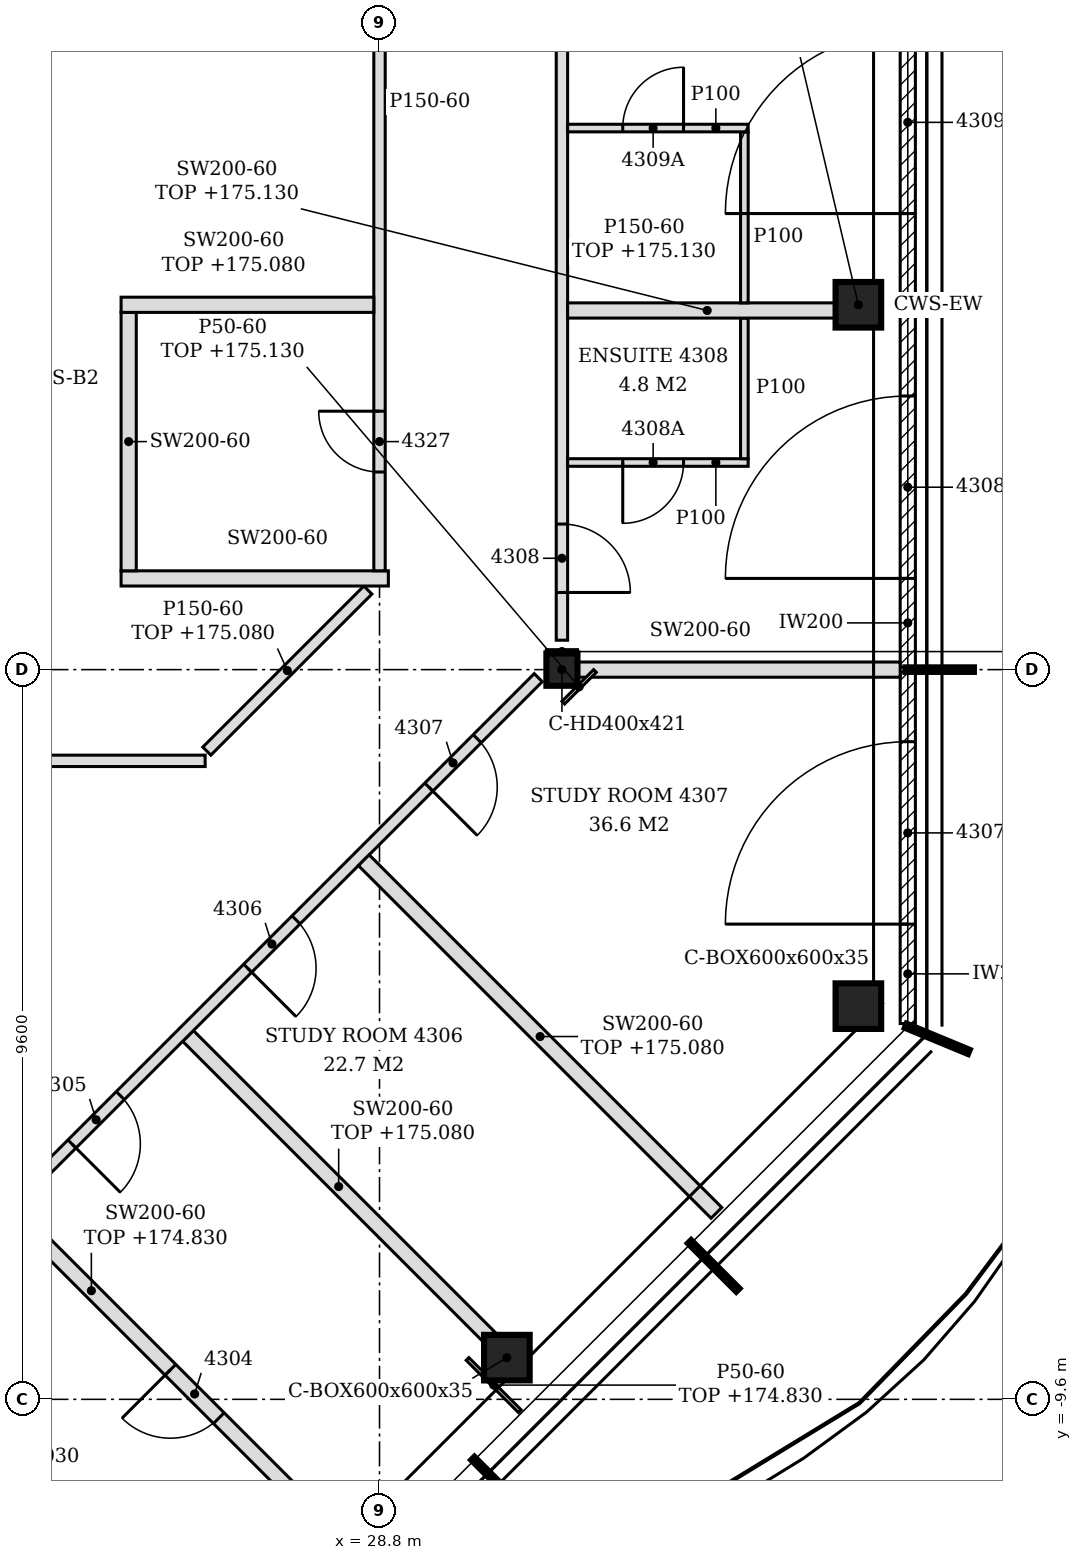
"""IFC4 building model, lengths in metres.
Left out: names, types, materials, properties, quantities, classifications, styles, units other than length and angle.
Written with IfcOpenShell. Run it as: python <this file> out.ifc"""

import sys

from ifc_helpers import new_model, si_unit, direction, frame, frame_2d, origin, origin_2d, place, context, subcontext, project, spatial, polyline, rectangle, hollow_rectangle, i_section, outline, extrude, clip, halfspace, element, fill, save


model = new_model("IFC4")
c1 = context("Model", 3, precision=1e-05, world=origin(), true_north=direction((0.0, 1.0)))
c2 = subcontext(c1, "Body", "Model", "MODEL_VIEW")
j1 = project(units=[si_unit("LENGTHUNIT", "METRE"), si_unit("PLANEANGLEUNIT", "RADIAN")], contexts=[c1])
p1 = place(None, origin())
s1 = spatial("IfcSite", under=j1, at=p1, CompositionType="ELEMENT")
p2 = place(p1, origin())
s2 = spatial("IfcBuilding", under=s1, at=p2, CompositionType="ELEMENT")
p3 = place(p2, frame((0.0, 0.0, 172.2)))
s3 = spatial("IfcBuildingStorey", under=s2, at=p3, CompositionType="ELEMENT", Elevation=172.2)
p4 = place(p3, frame((30.476, -9.052, -0.15), z_axis=(0.06235395728, -0.04152421884, 0.997189913337), x_axis=(0.554283476609, 0.832327956732, 0.0)))
e1 = element("IfcColumn", 1, at=p4, inside=s3, PredefinedType="COLUMN", context=c2, shape_type="Clipping", body=[
    clip(clip(extrude(hollow_rectangle(XDim=0.6, YDim=0.6, WallThickness=0.035, at=origin_2d()), origin(), (0.0, 0.0, 1.0), 3.61), halfspace(frame((0.0, 0.0, 0.011), z_axis=(0.0, 0.0, 1.0), x_axis=(1.0, 0.0, 0.0)), True)), halfspace(frame((0.0, 0.0, 3.588), z_axis=(0.0, 0.0, 1.0), x_axis=(1.0, 0.0, 0.0)), False)),
])
p5 = place(p3, frame((35.1, -4.427, -0.15), z_axis=(0.062286590776, -0.041524393851, 0.99719411617), x_axis=(0.554700196225, 0.832050294338, 0.0)))
e2 = element("IfcColumn", 2, at=p5, inside=s3, PredefinedType="COLUMN", context=c2, shape_type="Clipping", body=[
    clip(clip(extrude(hollow_rectangle(XDim=0.6, YDim=0.6, WallThickness=0.035, at=origin_2d()), origin(), (0.0, 0.0, 1.0), 3.61), halfspace(frame((0.0, 0.0, 0.011), z_axis=(0.0, 0.0, 1.0), x_axis=(1.0, 0.0, 0.0)), True)), halfspace(frame((0.0, 0.0, 3.588), z_axis=(0.0, 0.0, 1.0), x_axis=(1.0, 0.0, 0.0)), False)),
])
p6 = place(p3, frame((35.1, 4.8, -0.15), z_axis=(0.062286415717, -0.041591906261, 0.997191313515), x_axis=(0.555325171193, 0.831633305153, 0.0)))
e3 = element("IfcColumn", 3, at=p6, inside=s3, PredefinedType="COLUMN", context=c2, shape_type="Clipping", body=[
    clip(clip(extrude(hollow_rectangle(XDim=0.6, YDim=0.6, WallThickness=0.035, at=origin_2d()), origin(), (0.0, 0.0, 1.0), 3.61), halfspace(frame((0.0, 0.0, 0.011), z_axis=(0.0, 0.0, 1.0), x_axis=(1.0, 0.0, 0.0)), True)), halfspace(frame((0.0, 0.0, 3.588), z_axis=(0.0, 0.0, 1.0), x_axis=(1.0, 0.0, 0.0)), False)),
])
p7 = place(p3, frame((31.2, 0.0, -0.15), z_axis=(0.0, 0.0, 1.0), x_axis=(1.0, 0.0, 0.0)))
e4 = element("IfcColumn", 4, at=p7, inside=s3, PredefinedType="COLUMN", context=c2, shape_type="SweptSolid", body=[
    extrude(i_section(OverallWidth=0.409, OverallDepth=0.425, WebThickness=0.033, FlangeThickness=0.052, FilletRadius=0.015, at=origin_2d()), origin(), (0.0, 0.0, 1.0), 3.6),
])
p8 = place(p3, frame((35.75, -4.656, 0.0), z_axis=(0.0, 0.0, 1.0), x_axis=(0.0, 1.0, 0.0)))
e5 = element("IfcWall", 5, at=p8, inside=s3, PredefinedType="NOTDEFINED", context=c2, shape_type="SweptSolid", body=[
    extrude(rectangle(XDim=4.626, YDim=0.2, at=frame_2d((2.313, 0.0))), origin(), (0.0, 0.0, 1.0), 3.45),
])
p9 = place(p8, frame((1.308, 0.0, 0.0)))
e6 = element("IfcOpeningElement", 6, at=p9, cuts=e5, PredefinedType="OPENING", context=c2, shape_type="SweptSolid", body=[
    extrude(rectangle(XDim=2.4, YDim=2.4, at=frame_2d((1.2, 1.2))), frame((0.0, 0.11, 0.0), z_axis=(0.0, -1.0, 0.0), x_axis=(1.0, 0.0, 0.0)), (0.0, 0.0, 1.0), 0.22),
])
p10 = place(p3, frame((35.75, 0.03, 0.0), z_axis=(0.0, 0.0, 1.0), x_axis=(0.0, 1.0, 0.0)))
e7 = element("IfcWall", 7, at=p10, inside=s3, PredefinedType="NOTDEFINED", context=c2, shape_type="SweptSolid", body=[
    extrude(rectangle(XDim=4.74, YDim=0.2, at=frame_2d((2.37, 0.0))), origin(), (0.0, 0.0, 1.0), 3.45),
])
p11 = place(p10, frame((1.17, 0.0, 0.0)))
e8 = element("IfcOpeningElement", 8, at=p11, cuts=e7, PredefinedType="OPENING", context=c2, shape_type="SweptSolid", body=[
    extrude(rectangle(XDim=2.4, YDim=2.4, at=frame_2d((1.2, 1.2))), frame((0.0, 0.11, 0.0), z_axis=(0.0, -1.0, 0.0), x_axis=(1.0, 0.0, 0.0)), (0.0, 0.0, 1.0), 0.22),
])
p12 = place(p3, frame((35.75, 4.83, 0.0), z_axis=(0.0, 0.0, 1.0), x_axis=(0.0, 1.0, 0.0)))
e9 = element("IfcWall", 9, at=p12, inside=s3, PredefinedType="NOTDEFINED", context=c2, shape_type="SweptSolid", body=[
    extrude(rectangle(XDim=4.74, YDim=0.2, at=frame_2d((2.37, 0.0))), origin(), (0.0, 0.0, 1.0), 3.45),
])
p13 = place(p12, frame((1.17, 0.0, 0.0)))
e10 = element("IfcOpeningElement", 10, at=p13, cuts=e9, PredefinedType="OPENING", context=c2, shape_type="SweptSolid", body=[
    extrude(rectangle(XDim=2.4, YDim=2.4, at=frame_2d((1.2, 1.2))), frame((0.0, 0.11, 0.0), z_axis=(0.0, -1.0, 0.0), x_axis=(1.0, 0.0, 0.0)), (0.0, 0.0, 1.0), 0.22),
])
p14 = place(p3, frame((25.62, -13.406, 0.0), z_axis=(0.0, 0.0, 1.0), x_axis=(-0.707185011059, 0.707028542659, 0.0)))
e11 = element("IfcWall", 11, at=p14, inside=s3, PredefinedType="PARTITIONING", context=c2, shape_type="SweptSolid", body=[
    extrude(rectangle(XDim=4.681, YDim=0.2, at=frame_2d((2.34, 0.0))), origin(), (0.0, 0.0, 1.0), 3.45),
])
p15 = place(p3, frame((28.6, -11.762, 0.0), z_axis=(0.0, 0.0, 1.0), x_axis=(-0.707125420898, 0.707088140984, 0.0)))
e12 = element("IfcWall", 12, at=p15, inside=s3, PredefinedType="PARTITIONING", context=c2, shape_type="SweptSolid", body=[
    extrude(rectangle(XDim=6.549, YDim=0.2, at=frame_2d((3.274, 0.0))), origin(), (0.0, 0.0, 1.0), 2.63),
])
p16 = place(p15, frame((2.707, 0.0, 0.0)))
e13 = element("IfcOpeningElement", 13, at=p16, cuts=e12, PredefinedType="OPENING", context=c2, shape_type="SweptSolid", body=[
    extrude(rectangle(XDim=0.9, YDim=2.1, at=frame_2d((0.45, 1.05))), frame((0.0, 0.11, 0.0), z_axis=(0.0, -1.0, 0.0), x_axis=(1.0, 0.0, 0.0)), (0.0, 0.0, 1.0), 0.22),
])
p17 = place(p3, frame((30.244, -8.782, 0.0), z_axis=(0.0, 0.0, 1.0), x_axis=(-0.707106781187, 0.707106781187, 0.0)))
e14 = element("IfcWall", 14, at=p17, inside=s3, PredefinedType="PARTITIONING", context=c2, shape_type="SweptSolid", body=[
    extrude(rectangle(XDim=5.605, YDim=0.2, at=frame_2d((2.802, 0.0))), origin(), (0.0, 0.0, 1.0), 2.88),
])
p18 = place(p3, frame((22.722, -8.272, 0.0), z_axis=(0.0, 0.0, 1.0), x_axis=(0.707106781187, 0.707106781187, 0.0)))
e15 = element("IfcWall", 15, at=p18, inside=s3, PredefinedType="PARTITIONING", context=c2, shape_type="SweptSolid", body=[
    extrude(rectangle(XDim=11.549, YDim=0.15, at=frame_2d((5.774, 0.0))), origin(), (0.0, 0.0, 1.0), 2.88),
])
p19 = place(p18, frame((2.873, 0.0, 0.0)))
e16 = element("IfcOpeningElement", 16, at=p19, cuts=e15, PredefinedType="OPENING", context=c2, shape_type="SweptSolid", body=[
    extrude(rectangle(XDim=0.9, YDim=2.1, at=frame_2d((0.45, 1.05))), frame((0.0, 0.085, 0.0), z_axis=(0.0, -1.0, 0.0), x_axis=(1.0, 0.0, 0.0)), (0.0, 0.0, 1.0), 0.17),
])
p20 = place(p18, frame((6.143, 0.0, 0.0)))
e17 = element("IfcOpeningElement", 17, at=p20, cuts=e15, PredefinedType="OPENING", context=c2, shape_type="SweptSolid", body=[
    extrude(rectangle(XDim=0.9, YDim=2.1, at=frame_2d((0.45, 1.05))), frame((0.0, 0.085, 0.0), z_axis=(0.0, -1.0, 0.0), x_axis=(1.0, 0.0, 0.0)), (0.0, 0.0, 1.0), 0.17),
])
p21 = place(p18, frame((9.513, 0.0, 0.0)))
e18 = element("IfcOpeningElement", 18, at=p21, cuts=e15, PredefinedType="OPENING", context=c2, shape_type="SweptSolid", body=[
    extrude(rectangle(XDim=0.9, YDim=2.1, at=frame_2d((0.45, 1.05))), frame((0.0, 0.085, 0.0), z_axis=(0.0, -1.0, 0.0), x_axis=(1.0, 0.0, 0.0)), (0.0, 0.0, 1.0), 0.17),
])
p22 = place(p3, frame((33.233, -7.147, 0.0), z_axis=(0.0, 0.0, 1.0), x_axis=(-0.707106781187, 0.707106781187, 0.0)))
e19 = element("IfcWall", 19, at=p22, inside=s3, PredefinedType="PARTITIONING", context=c2, shape_type="SweptSolid", body=[
    extrude(rectangle(XDim=6.562, YDim=0.2, at=frame_2d((3.281, 0.0))), origin(), (0.0, 0.0, 1.0), 2.88),
])
p23 = place(p3, frame((19.125, -1.2, 0.0), z_axis=(0.0, 0.0, 1.0), x_axis=(1.0, 0.0, 0.0)))
e20 = element("IfcWall", 20, at=p23, inside=s3, PredefinedType="PARTITIONING", context=c2, shape_type="SweptSolid", body=[
    extrude(outline(polyline([(0.0, 0.0), (7.381, 0.0), (7.381, 3.45), (0.225, 3.45), (0.223, 2.83), (0.0, 2.83), (0.0, 0.0)])), frame((0.0, 0.075, 0.0), z_axis=(0.0, -1.0, 0.0), x_axis=(1.0, 0.0, 0.0)), (0.0, 0.0, 1.0), 0.15),
])
p24 = place(p3, frame((26.528, -1.072, 0.0), z_axis=(0.0, 0.0, 1.0), x_axis=(0.707106781187, 0.707106781187, 0.0)))
e21 = element("IfcWall", 21, at=p24, inside=s3, PredefinedType="PARTITIONING", context=c2, shape_type="SweptSolid", body=[
    extrude(rectangle(XDim=2.997, YDim=0.15, at=frame_2d((1.498, 0.0))), origin(), (0.0, 0.0, 1.0), 2.88),
])
p25 = place(p3, frame((31.405, 0.0, 0.0), z_axis=(0.0, 0.0, 1.0), x_axis=(1.0, 0.0, 0.0)))
e22 = element("IfcWall", 22, at=p25, inside=s3, PredefinedType="PARTITIONING", context=c2, shape_type="SweptSolid", body=[
    extrude(outline(polyline([(0.0, 0.0), (4.245, 0.0), (4.246, 3.45), (4.071, 3.45), (4.069, 2.93), (3.771, 2.93), (3.769, 3.07), (0.0, 3.07), (0.0, 0.0)])), frame((0.0, 0.1, 0.0), z_axis=(0.0, -1.0, 0.0), x_axis=(1.0, 0.0, 0.0)), (0.0, 0.0, 1.0), 0.2),
])
p26 = place(p3, frame((31.2, 0.387, 0.0), z_axis=(0.0, 0.0, 1.0), x_axis=(0.0, 1.0, 0.0)))
e23 = element("IfcWall", 23, at=p26, inside=s3, PredefinedType="PARTITIONING", context=c2, shape_type="SweptSolid", body=[
    extrude(rectangle(XDim=9.0, YDim=0.15, at=frame_2d((4.5, 0.0))), origin(), (0.0, 0.0, 1.0), 2.93),
])
p27 = place(p26, frame((0.628, 0.0, 0.0)))
e24 = element("IfcOpeningElement", 24, at=p27, cuts=e23, PredefinedType="OPENING", context=c2, shape_type="SweptSolid", body=[
    extrude(rectangle(XDim=0.9, YDim=2.1, at=frame_2d((0.45, 1.05))), frame((0.0, 0.085, 0.0), z_axis=(0.0, -1.0, 0.0), x_axis=(1.0, 0.0, 0.0)), (0.0, 0.0, 1.0), 0.17),
])
p28 = place(p3, frame((25.4, 1.2, 0.0), z_axis=(0.0, 0.0, 1.0), x_axis=(1.0, 0.0, 0.0)))
e25 = element("IfcWall", 25, at=p28, inside=s3, PredefinedType="PARTITIONING", context=c2, shape_type="SweptSolid", body=[
    extrude(rectangle(XDim=3.517, YDim=0.2, at=frame_2d((1.758, 0.0))), origin(), (0.0, 0.0, 1.0), 3.45),
])
p29 = place(p3, frame((25.5, 1.3, 0.0), z_axis=(0.0, 0.0, 1.0), x_axis=(0.0, 1.0, 0.0)))
e26 = element("IfcWall", 26, at=p29, inside=s3, PredefinedType="PARTITIONING", context=c2, shape_type="SweptSolid", body=[
    extrude(outline(polyline([(0.0, 0.0), (3.4, 0.0), (3.4, 2.88), (3.245, 2.88), (3.243, 3.45), (0.0, 3.45), (0.0, 0.0)])), frame((0.0, 0.1, 0.0), z_axis=(0.0, -1.0, 0.0), x_axis=(1.0, 0.0, 0.0)), (0.0, 0.0, 1.0), 0.2),
])
p30 = place(p3, frame((28.8, 1.3, 0.0), z_axis=(0.0, 0.0, 1.0), x_axis=(0.0, 1.0, 0.0)))
e27 = element("IfcWall", 27, at=p30, inside=s3, PredefinedType="PARTITIONING", context=c2, shape_type="SweptSolid", body=[
    extrude(outline(polyline([(0.0, 0.0), (10.224, 0.0), (10.224, 3.45), (8.255, 3.45), (8.253, 2.88), (8.045, 2.88), (8.043, 3.45), (3.455, 3.45), (3.453, 2.88), (3.245, 2.88), (3.243, 3.45), (0.0, 3.45), (0.0, 0.0)])), frame((0.0, 0.075, 0.0), z_axis=(0.0, -1.0, 0.0), x_axis=(1.0, 0.0, 0.0)), (0.0, 0.0, 1.0), 0.15),
])
p31 = place(p30, frame((1.3, 0.0, 0.0)))
e28 = element("IfcOpeningElement", 28, at=p31, cuts=e27, PredefinedType="OPENING", context=c2, shape_type="SweptSolid", body=[
    extrude(rectangle(XDim=0.8, YDim=2.1, at=frame_2d((0.4, 1.05))), frame((0.0, 0.085, 0.0), z_axis=(0.0, -1.0, 0.0), x_axis=(1.0, 0.0, 0.0)), (0.0, 0.0, 1.0), 0.17),
])
p32 = place(p3, frame((31.275, 2.725, 0.0), z_axis=(0.0, 0.0, 1.0), x_axis=(1.0, 0.0, 0.0)))
e29 = element("IfcWall", 29, at=p32, inside=s3, PredefinedType="PARTITIONING", context=c2, shape_type="SweptSolid", body=[
    extrude(outline(polyline([(0.0, 0.0), (2.375, 0.0), (2.375, 3.45), (0.075, 3.45), (0.073, 2.93), (0.0, 2.93), (0.0, 0.0)])), frame((0.0, 0.05, 0.0), z_axis=(0.0, -1.0, 0.0), x_axis=(1.0, 0.0, 0.0)), (0.0, 0.0, 1.0), 0.1),
])
p33 = place(p32, frame((0.725, 0.0, 0.0)))
e30 = element("IfcOpeningElement", 30, at=p33, cuts=e29, PredefinedType="OPENING", context=c2, shape_type="SweptSolid", body=[
    extrude(rectangle(XDim=0.8, YDim=2.1, at=frame_2d((0.4, 1.05))), frame((0.0, 0.06, 0.0), z_axis=(0.0, -1.0, 0.0), x_axis=(1.0, 0.0, 0.0)), (0.0, 0.0, 1.0), 0.12),
])
p34 = place(p3, frame((33.6, 2.775, 0.0), z_axis=(0.0, 0.0, 1.0), x_axis=(0.0, 1.0, 0.0)))
e31 = element("IfcWall", 31, at=p34, inside=s3, PredefinedType="PARTITIONING", context=c2, shape_type="SweptSolid", body=[
    extrude(outline(polyline([(0.0, 0.0), (1.85, 0.0), (1.85, 3.07), (1.79, 3.07), (1.788, 3.45), (0.0, 3.45), (0.0, 0.0)])), frame((0.0, 0.05, 0.0), z_axis=(0.0, -1.0, 0.0), x_axis=(1.0, 0.0, 0.0)), (0.0, 0.0, 1.0), 0.1),
])
p35 = place(p3, frame((31.275, 4.725, 0.0), z_axis=(0.0, 0.0, 1.0), x_axis=(1.0, 0.0, 0.0)))
e32 = element("IfcWall", 32, at=p35, inside=s3, PredefinedType="PARTITIONING", context=c2, shape_type="SweptSolid", body=[
    extrude(outline(polyline([(0.0, 0.0), (3.418, 0.0), (3.472, 0.863), (3.525, 1.725), (3.594, 2.588), (3.625, 2.93), (0.0, 2.93), (0.0, 2.588), (0.0, 1.725), (0.0, 0.863), (0.0, 0.0)])), frame((0.0, 0.1, 0.0), z_axis=(0.0, -1.0, 0.0), x_axis=(1.0, 0.0, 0.0)), (0.0, 0.0, 1.0), 0.2),
])
p36 = place(p3, frame((25.4, 4.8, 0.0), z_axis=(0.0, 0.0, 1.0), x_axis=(1.0, 0.0, 0.0)))
e33 = element("IfcWall", 33, at=p36, inside=s3, PredefinedType="PARTITIONING", context=c2, shape_type="SweptSolid", body=[
    extrude(rectangle(XDim=3.325, YDim=0.2, at=frame_2d((1.663, 0.0))), origin(), (0.0, 0.0, 1.0), 2.88),
])
p37 = place(p3, frame((33.6, 4.825, 0.0), z_axis=(0.0, 0.0, 1.0), x_axis=(0.0, 1.0, 0.0)))
e34 = element("IfcWall", 34, at=p37, inside=s3, PredefinedType="PARTITIONING", context=c2, shape_type="SweptSolid", body=[
    extrude(rectangle(XDim=2.25, YDim=0.1, at=frame_2d((1.125, 0.0))), origin(), (0.0, 0.0, 1.0), 3.45),
])
p38 = place(p3, frame((31.275, 7.125, 0.0), z_axis=(0.0, 0.0, 1.0), x_axis=(1.0, 0.0, 0.0)))
e35 = element("IfcWall", 35, at=p38, inside=s3, PredefinedType="PARTITIONING", context=c2, shape_type="SweptSolid", body=[
    extrude(outline(polyline([(0.0, 0.0), (2.375, 0.0), (2.375, 3.45), (0.075, 3.45), (0.073, 2.93), (0.0, 2.93), (0.0, 0.0)])), frame((0.0, 0.05, 0.0), z_axis=(0.0, -1.0, 0.0), x_axis=(1.0, 0.0, 0.0)), (0.0, 0.0, 1.0), 0.1),
])
p39 = place(p38, frame((0.725, 0.0, 0.0)))
e36 = element("IfcOpeningElement", 36, at=p39, cuts=e35, PredefinedType="OPENING", context=c2, shape_type="SweptSolid", body=[
    extrude(rectangle(XDim=0.8, YDim=2.1, at=frame_2d((0.4, 1.05))), frame((0.0, 0.06, 0.0), z_axis=(0.0, -1.0, 0.0), x_axis=(1.0, 0.0, 0.0)), (0.0, 0.0, 1.0), 0.12),
])
p40 = place(p3, frame((30.646, -9.757, 0.0), z_axis=(0.0, 0.0, 1.0), x_axis=(-0.707106781187, 0.707106781187, 0.0)))
e37 = element("IfcWall", 37, at=p40, inside=s3, PredefinedType="PARTITIONING", context=c2, shape_type="SweptSolid", body=[
    extrude(rectangle(XDim=0.973, YDim=0.05, at=frame_2d((0.486, 0.0))), origin(), (0.0, 0.0, 1.0), 2.63),
])
p41 = place(p3, frame((31.218, -0.435, 0.0), z_axis=(0.0, 0.0, 1.0), x_axis=(0.706899813022, 0.70731368879, 0.0)))
e38 = element("IfcWall", 38, at=p41, inside=s3, PredefinedType="PARTITIONING", context=c2, shape_type="SweptSolid", body=[
    extrude(rectangle(XDim=0.59, YDim=0.05, at=frame_2d((0.295, 0.0))), origin(), (0.0, 0.0, 1.0), 2.93),
])
p42 = place(p3, frame((30.996, 0.238, 0.0), z_axis=(0.0, 0.0, 1.0), x_axis=(1.0, 0.0, 0.0)))
e39 = element("IfcWall", 39, at=p42, inside=s3, PredefinedType="PARTITIONING", context=c2, shape_type="SweptSolid", body=[
    extrude(rectangle(XDim=0.409, YDim=0.05, at=frame_2d((0.205, 0.0))), origin(), (0.0, 0.0, 1.0), 2.93),
])
p43 = place(p9, origin())
e40 = element("IfcDoor", 40, at=p43, inside=s3, OperationType="SINGLE_SWING_LEFT", PredefinedType="DOOR", context=c2, shape_type="SweptSolid", body=[
    extrude(rectangle(XDim=2.4, YDim=2.4, at=frame_2d((1.2, 1.2))), frame((0.0, 0.025, 0.0), z_axis=(0.0, -1.0, 0.0), x_axis=(1.0, 0.0, 0.0)), (0.0, 0.0, 1.0), 0.05),
])
fill(e6, e40)
p44 = place(p11, origin())
e41 = element("IfcDoor", 41, at=p44, inside=s3, OperationType="SINGLE_SWING_LEFT", PredefinedType="DOOR", context=c2, shape_type="SweptSolid", body=[
    extrude(rectangle(XDim=2.4, YDim=2.4, at=frame_2d((1.2, 1.2))), frame((0.0, 0.025, 0.0), z_axis=(0.0, -1.0, 0.0), x_axis=(1.0, 0.0, 0.0)), (0.0, 0.0, 1.0), 0.05),
])
fill(e8, e41)
p45 = place(p13, origin())
e42 = element("IfcDoor", 42, at=p45, inside=s3, OperationType="SINGLE_SWING_LEFT", PredefinedType="DOOR", context=c2, shape_type="SweptSolid", body=[
    extrude(rectangle(XDim=2.4, YDim=2.4, at=frame_2d((1.2, 1.2))), frame((0.0, 0.025, 0.0), z_axis=(0.0, -1.0, 0.0), x_axis=(1.0, 0.0, 0.0)), (0.0, 0.0, 1.0), 0.05),
])
fill(e10, e42)
p46 = place(p16, origin())
e43 = element("IfcDoor", 43, at=p46, inside=s3, OperationType="SINGLE_SWING_RIGHT", PredefinedType="DOOR", context=c2, shape_type="SweptSolid", body=[
    extrude(rectangle(XDim=0.9, YDim=2.1, at=frame_2d((0.45, 1.05))), frame((0.0, 0.025, 0.0), z_axis=(0.0, -1.0, 0.0), x_axis=(1.0, 0.0, 0.0)), (0.0, 0.0, 1.0), 0.05),
])
fill(e13, e43)
p47 = place(p19, frame((0.9, 0.0, 0.0), z_axis=(0.0, 0.0, 1.0), x_axis=(-1.0, 0.0, 0.0)))
e44 = element("IfcDoor", 44, at=p47, inside=s3, OperationType="SINGLE_SWING_RIGHT", PredefinedType="DOOR", context=c2, shape_type="SweptSolid", body=[
    extrude(rectangle(XDim=0.9, YDim=2.1, at=frame_2d((0.45, 1.05))), frame((0.0, 0.025, 0.0), z_axis=(0.0, -1.0, 0.0), x_axis=(1.0, 0.0, 0.0)), (0.0, 0.0, 1.0), 0.05),
])
fill(e16, e44)
p48 = place(p20, frame((0.9, 0.0, 0.0), z_axis=(0.0, 0.0, 1.0), x_axis=(-1.0, 0.0, 0.0)))
e45 = element("IfcDoor", 45, at=p48, inside=s3, OperationType="SINGLE_SWING_RIGHT", PredefinedType="DOOR", context=c2, shape_type="SweptSolid", body=[
    extrude(rectangle(XDim=0.9, YDim=2.1, at=frame_2d((0.45, 1.05))), frame((0.0, 0.025, 0.0), z_axis=(0.0, -1.0, 0.0), x_axis=(1.0, 0.0, 0.0)), (0.0, 0.0, 1.0), 0.05),
])
fill(e17, e45)
p49 = place(p21, frame((0.9, 0.0, 0.0), z_axis=(0.0, 0.0, 1.0), x_axis=(-1.0, 0.0, 0.0)))
e46 = element("IfcDoor", 46, at=p49, inside=s3, OperationType="SINGLE_SWING_RIGHT", PredefinedType="DOOR", context=c2, shape_type="SweptSolid", body=[
    extrude(rectangle(XDim=0.9, YDim=2.1, at=frame_2d((0.45, 1.05))), frame((0.0, 0.025, 0.0), z_axis=(0.0, -1.0, 0.0), x_axis=(1.0, 0.0, 0.0)), (0.0, 0.0, 1.0), 0.05),
])
fill(e18, e46)
p50 = place(p27, frame((0.9, 0.0, 0.0), z_axis=(0.0, 0.0, 1.0), x_axis=(-1.0, 0.0, 0.0)))
e47 = element("IfcDoor", 47, at=p50, inside=s3, OperationType="SINGLE_SWING_RIGHT", PredefinedType="DOOR", context=c2, shape_type="SweptSolid", body=[
    extrude(rectangle(XDim=0.9, YDim=2.1, at=frame_2d((0.45, 1.05))), frame((0.0, 0.025, 0.0), z_axis=(0.0, -1.0, 0.0), x_axis=(1.0, 0.0, 0.0)), (0.0, 0.0, 1.0), 0.05),
])
fill(e24, e47)
p51 = place(p33, frame((0.8, 0.0, 0.0), z_axis=(0.0, 0.0, 1.0), x_axis=(-1.0, 0.0, 0.0)))
e48 = element("IfcDoor", 48, at=p51, inside=s3, OperationType="SINGLE_SWING_RIGHT", PredefinedType="DOOR", context=c2, shape_type="SweptSolid", body=[
    extrude(rectangle(XDim=0.8, YDim=2.1, at=frame_2d((0.4, 1.05))), frame((0.0, 0.025, 0.0), z_axis=(0.0, -1.0, 0.0), x_axis=(1.0, 0.0, 0.0)), (0.0, 0.0, 1.0), 0.05),
])
fill(e30, e48)
p52 = place(p39, origin())
e49 = element("IfcDoor", 49, at=p52, inside=s3, OperationType="SINGLE_SWING_RIGHT", PredefinedType="DOOR", context=c2, shape_type="SweptSolid", body=[
    extrude(rectangle(XDim=0.8, YDim=2.1, at=frame_2d((0.4, 1.05))), frame((0.0, 0.025, 0.0), z_axis=(0.0, -1.0, 0.0), x_axis=(1.0, 0.0, 0.0)), (0.0, 0.0, 1.0), 0.05),
])
fill(e36, e49)
p53 = place(p31, origin())
e50 = element("IfcDoor", 50, at=p53, inside=s3, OperationType="SINGLE_SWING_RIGHT", PredefinedType="DOOR", context=c2, shape_type="SweptSolid", body=[
    extrude(rectangle(XDim=0.8, YDim=2.1, at=frame_2d((0.4, 1.05))), frame((0.0, 0.025, 0.0), z_axis=(0.0, -1.0, 0.0), x_axis=(1.0, 0.0, 0.0)), (0.0, 0.0, 1.0), 0.05),
])
fill(e28, e50)
save(model, sys.argv[1])
